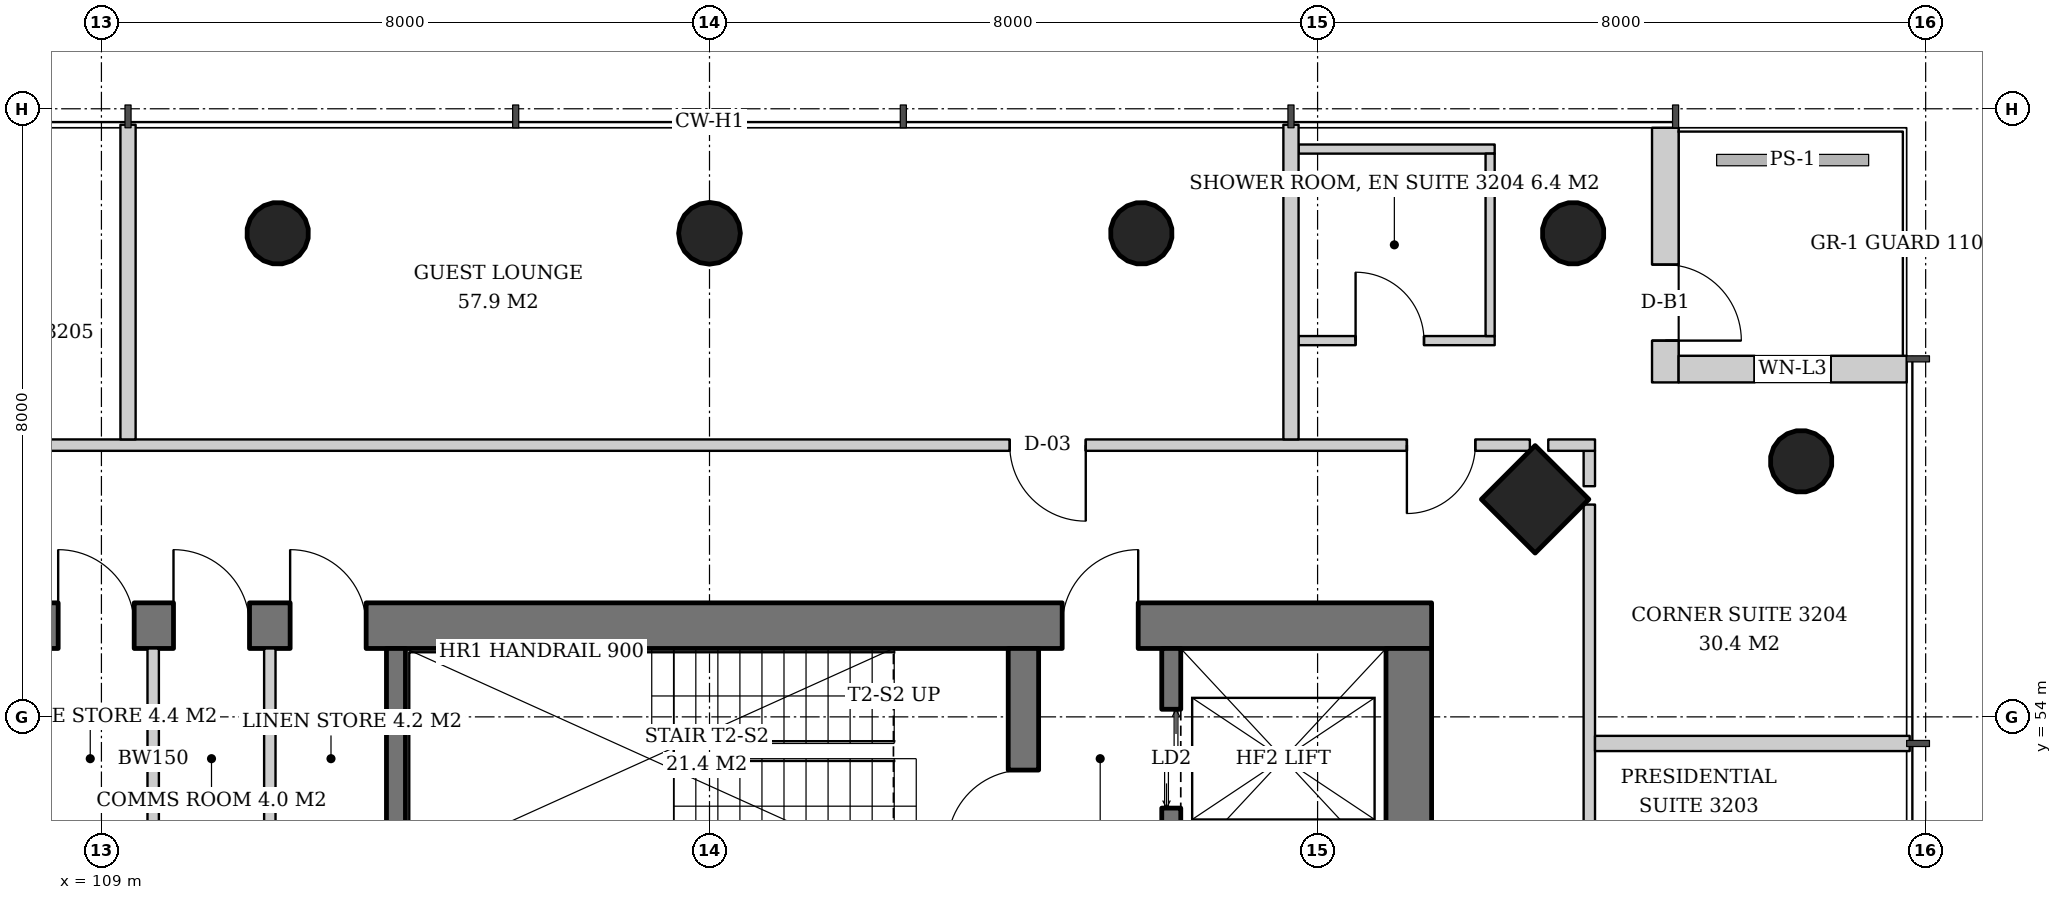
"""IFC4 building model, lengths in metres.
Left out: names, types, materials, properties, quantities, classifications, styles, units other than length and angle.
Written with IfcOpenShell. Run it as: python <this file> out.ifc"""

import sys

from ifc_helpers import new_model, si_unit, direction, frame, frame_2d, origin, origin_2d, place, context, subcontext, project, spatial, rectangle, hollow_circle, extrude, element, fill, save


model = new_model("IFC4")
c1 = context("Model", 3, precision=1e-05, world=origin(), true_north=direction((0.0, 1.0)))
c2 = subcontext(c1, "Body", "Model", "MODEL_VIEW")
j1 = project(units=[si_unit("LENGTHUNIT", "METRE"), si_unit("PLANEANGLEUNIT", "RADIAN")], contexts=[c1])
p1 = place(None, origin())
s1 = spatial("IfcSite", under=j1, at=p1, CompositionType="ELEMENT")
p2 = place(p1, origin())
s2 = spatial("IfcBuilding", under=s1, at=p2, CompositionType="ELEMENT")
p3 = place(p2, frame((0.0, 0.0, 127.4)))
s3 = spatial("IfcBuildingStorey", under=s2, at=p3, CompositionType="ELEMENT", Elevation=127.4)
p4 = place(p3, frame((127.914, 56.914, 0.0), z_axis=(-0.043029647111, -0.043029647111, 0.998146732169), x_axis=(0.707106781187, -0.707106781187, 0.0)))
e1 = element("IfcColumn", 1, at=p4, inside=s3, PredefinedType="COLUMN", context=c2, shape_type="SweptSolid", body=[
    extrude(rectangle(XDim=1.0, YDim=1.0, at=origin_2d()), origin(), (0.0, 0.0, 1.0), 3.807),
])
for number, where, z_axis, x_axis in (
    (2, (131.414, 57.414, 0.0), (-0.043, -0.043, 0.998), (0.707, -0.707, 0.0)),
    (3, (128.414, 60.414, 0.0), (-0.043, -0.043, 0.998), (0.707, -0.707, 0.0)),
):
    element("IfcColumn", number, at=place(p3, frame(where, z_axis=z_axis, x_axis=x_axis)), inside=s3, PredefinedType="COLUMN", context=c2, shape_type="SweptSolid", body=[
        extrude(hollow_circle(Radius=0.406, WallThickness=0.03, at=origin_2d()), origin(), (0.0, 0.0, 1.0), 3.807),
    ])
p5 = place(p3, frame((122.707, 60.414, 0.0), z_axis=(-0.021497706284, -0.043059584825, 0.998841188968), x_axis=(0.894693706707, -0.446680166538, 0.0)))
e4 = element("IfcColumn", 4, at=p5, inside=s3, PredefinedType="COLUMN", context=c2, shape_type="SweptSolid", body=[
    extrude(hollow_circle(Radius=0.406, WallThickness=0.03, at=origin_2d()), origin(), (0.0, 0.0, 1.0), 3.804),
])
p6 = place(p3, frame((117.0, 60.414, 0.0), z_axis=(0.0, -0.043069538298, 0.999072076915), x_axis=(1.0, 0.0, 0.0)))
e5 = element("IfcColumn", 5, at=p6, inside=s3, PredefinedType="COLUMN", context=c2, shape_type="SweptSolid", body=[
    extrude(hollow_circle(Radius=0.406, WallThickness=0.03, at=origin_2d()), origin(), (0.0, 0.0, 1.0), 3.803),
])
p7 = place(p3, frame((111.293, 60.414, 0.0), z_axis=(0.021497706284, -0.043059584825, 0.998841188968), x_axis=(0.894693706707, 0.446680166538, 0.0)))
e6 = element("IfcColumn", 6, at=p7, inside=s3, PredefinedType="COLUMN", context=c2, shape_type="SweptSolid", body=[
    extrude(hollow_circle(Radius=0.406, WallThickness=0.03, at=origin_2d()), origin(), (0.0, 0.0, 1.0), 3.804),
])
p8 = place(p3, frame((107.5, 55.2, 0.0), z_axis=(0.0, 0.0, 1.0), x_axis=(1.0, 0.0, 0.0)))
e7 = element("IfcWall", 7, at=p8, inside=s3, PredefinedType="SHEAR", context=c2, shape_type="SweptSolid", body=[
    extrude(rectangle(XDim=19.0, YDim=0.6, at=frame_2d((9.5, 0.0))), origin(), (0.0, 0.0, 1.0), 3.8),
])
p9 = place(p8, frame((14.14, 0.0, 0.0)))
e8 = element("IfcOpeningElement", 8, at=p9, cuts=e7, PredefinedType="OPENING", context=c2, shape_type="SweptSolid", body=[
    extrude(rectangle(XDim=1.0, YDim=2.1, at=frame_2d((0.5, 1.05))), frame((0.0, 0.31, 0.0), z_axis=(0.0, -1.0, 0.0), x_axis=(1.0, 0.0, 0.0)), (0.0, 0.0, 1.0), 0.62),
])
p10 = place(p8, frame((0.931, 0.0, 0.0)))
e9 = element("IfcOpeningElement", 9, at=p10, cuts=e7, PredefinedType="OPENING", context=c2, shape_type="SweptSolid", body=[
    extrude(rectangle(XDim=1.0, YDim=2.1, at=frame_2d((0.5, 1.05))), frame((0.0, 0.31, 0.0), z_axis=(0.0, -1.0, 0.0), x_axis=(1.0, 0.0, 0.0)), (0.0, 0.0, 1.0), 0.62),
])
p11 = place(p8, frame((2.448, 0.0, 0.0)))
e10 = element("IfcOpeningElement", 10, at=p11, cuts=e7, PredefinedType="OPENING", context=c2, shape_type="SweptSolid", body=[
    extrude(rectangle(XDim=1.0, YDim=2.1, at=frame_2d((0.5, 1.05))), frame((0.0, 0.31, 0.0), z_axis=(0.0, -1.0, 0.0), x_axis=(1.0, 0.0, 0.0)), (0.0, 0.0, 1.0), 0.62),
])
p12 = place(p8, frame((3.983, 0.0, 0.0)))
e11 = element("IfcOpeningElement", 11, at=p12, cuts=e7, PredefinedType="OPENING", context=c2, shape_type="SweptSolid", body=[
    extrude(rectangle(XDim=1.0, YDim=2.1, at=frame_2d((0.5, 1.05))), frame((0.0, 0.31, 0.0), z_axis=(0.0, -1.0, 0.0), x_axis=(1.0, 0.0, 0.0)), (0.0, 0.0, 1.0), 0.62),
])
p13 = place(p3, frame((126.2, 37.1, 0.0), z_axis=(0.0, 0.0, 1.0), x_axis=(0.0, 1.0, 0.0)))
e12 = element("IfcWall", 12, at=p13, inside=s3, PredefinedType="SHEAR", context=c2, shape_type="SweptSolid", body=[
    extrude(rectangle(XDim=17.8, YDim=0.6, at=frame_2d((8.9, 0.0))), origin(), (0.0, 0.0, 1.0), 3.8),
])
p14 = place(p13, frame((8.0, 0.0, 0.0)))
e13 = element("IfcOpeningElement", 13, at=p14, cuts=e12, PredefinedType="OPENING", context=c2, shape_type="SweptSolid", body=[
    extrude(rectangle(XDim=1.8, YDim=2.4, at=frame_2d((0.9, 1.2))), frame((0.0, 0.31, 0.0), z_axis=(0.0, -1.0, 0.0), x_axis=(1.0, 0.0, 0.0)), (0.0, 0.0, 1.0), 0.62),
])
p15 = place(p3, frame((121.13, 52.0, 0.0), z_axis=(0.0, 0.0, 1.0), x_axis=(0.0, 1.0, 0.0)))
e14 = element("IfcWall", 14, at=p15, inside=s3, PredefinedType="SHEAR", context=c2, shape_type="SweptSolid", body=[
    extrude(rectangle(XDim=2.9, YDim=0.4, at=frame_2d((1.45, 0.0))), origin(), (0.0, 0.0, 1.0), 3.8),
])
p16 = place(p15, frame((0.3, 0.0, 0.0)))
e15 = element("IfcOpeningElement", 15, at=p16, cuts=e14, PredefinedType="OPENING", context=c2, shape_type="SweptSolid", body=[
    extrude(rectangle(XDim=1.0, YDim=2.1, at=frame_2d((0.5, 1.05))), frame((0.0, 0.21, 0.0), z_axis=(0.0, -1.0, 0.0), x_axis=(1.0, 0.0, 0.0)), (0.0, 0.0, 1.0), 0.42),
])
p17 = place(p3, frame((129.575, 61.75, 0.0), z_axis=(0.0, 0.0, 1.0), x_axis=(0.0, -1.0, 0.0)))
e16 = element("IfcWall", 16, at=p17, inside=s3, PredefinedType="SOLIDWALL", context=c2, shape_type="SweptSolid", body=[
    extrude(rectangle(XDim=3.35, YDim=0.35, at=frame_2d((1.675, 0.0))), origin(), (0.0, 0.0, 1.0), 3.35),
])
p18 = place(p17, frame((1.8, 0.0, 0.0)))
e17 = element("IfcOpeningElement", 17, at=p18, cuts=e16, PredefinedType="OPENING", context=c2, shape_type="SweptSolid", body=[
    extrude(rectangle(XDim=1.0, YDim=2.4, at=frame_2d((0.5, 1.2))), frame((0.0, 0.185, 0.0), z_axis=(0.0, -1.0, 0.0), x_axis=(1.0, 0.0, 0.0)), (0.0, 0.0, 1.0), 0.37),
])
p19 = place(p3, frame((129.75, 58.575, 0.0), z_axis=(0.0, 0.0, 1.0), x_axis=(1.0, 0.0, 0.0)))
e18 = element("IfcWall", 18, at=p19, inside=s3, PredefinedType="SOLIDWALL", context=c2, shape_type="SweptSolid", body=[
    extrude(rectangle(XDim=3.0, YDim=0.35, at=frame_2d((1.5, 0.0))), origin(), (0.0, 0.0, 1.0), 3.35),
])
p20 = place(p19, frame((1.0, 0.0, 0.65)))
e19 = element("IfcOpeningElement", 19, at=p20, cuts=e18, PredefinedType="OPENING", context=c2, shape_type="SweptSolid", body=[
    extrude(rectangle(XDim=1.0, YDim=2.4, at=frame_2d((0.5, 1.2))), frame((0.0, 0.185, 0.0), z_axis=(0.0, -1.0, 0.0), x_axis=(1.0, 0.0, 0.0)), (0.0, 0.0, 1.0), 0.37),
])
p21 = place(p3, frame((112.875, 52.0, 0.0), z_axis=(0.0, 0.0, 1.0), x_axis=(0.0, 1.0, 0.0)))
e20 = element("IfcWall", 20, at=p21, inside=s3, PredefinedType="SHEAR", context=c2, shape_type="SweptSolid", body=[
    extrude(rectangle(XDim=2.9, YDim=0.25, at=frame_2d((1.45, 0.0))), origin(), (0.0, 0.0, 1.0), 3.8),
])
p22 = place(p3, frame((123.075, 52.0, 0.0), z_axis=(0.0, 0.0, 1.0), x_axis=(0.0, 1.0, 0.0)))
e21 = element("IfcWall", 21, at=p22, inside=s3, PredefinedType="SHEAR", context=c2, shape_type="SweptSolid", body=[
    extrude(rectangle(XDim=2.9, YDim=0.25, at=frame_2d((1.45, 0.0))), origin(), (0.0, 0.0, 1.0), 3.8),
])
p23 = place(p22, frame((0.8, 0.0, 0.0)))
e22 = element("IfcOpeningElement", 22, at=p23, cuts=e21, PredefinedType="OPENING", context=c2, shape_type="SweptSolid", body=[
    extrude(rectangle(XDim=1.3, YDim=2.2, at=frame_2d((0.65, 1.1))), frame((0.0, 0.135, 0.0), z_axis=(0.0, -1.0, 0.0), x_axis=(1.0, 0.0, 0.0)), (0.0, 0.0, 1.0), 0.27),
])
for number, where, z_axis, x_axis in (
    (23, (109.681, 52.0, 0.0), (0.0, 0.0, 1.0), (0.0, 1.0, 0.0)),
    (24, (111.216, 52.0, 0.0), (0.0, 0.0, 1.0), (0.0, 1.0, 0.0)),
):
    element("IfcWall", number, at=place(p3, frame(where, z_axis=z_axis, x_axis=x_axis)), inside=s3, PredefinedType="SOLIDWALL", context=c2, shape_type="SweptSolid", body=[
        extrude(rectangle(XDim=2.9, YDim=0.15, at=frame_2d((1.45, 0.0))), origin(), (0.0, 0.0, 1.0), 3.35),
    ])
p24 = place(p3, frame((128.575, 35.207, 0.0), z_axis=(0.0, 0.0, 1.0), x_axis=(0.0, 1.0, 0.0)))
e25 = element("IfcWall", 25, at=p24, inside=s3, PredefinedType="PARTITIONING", context=c2, shape_type="SweptSolid", body=[
    extrude(rectangle(XDim=21.586, YDim=0.15, at=frame_2d((10.793, 0.0))), origin(), (0.0, 0.0, 1.0), 2.338),
])
p25 = place(p24, frame((0.718, 0.0, 0.0)))
e26 = element("IfcOpeningElement", 26, at=p25, cuts=e25, PredefinedType="OPENING", context=c2, shape_type="SweptSolid", body=[
    extrude(rectangle(XDim=0.9, YDim=2.1, at=frame_2d((0.45, 1.05))), frame((0.0, 0.085, 0.0), z_axis=(0.0, -1.0, 0.0), x_axis=(1.0, 0.0, 0.0)), (0.0, 0.0, 1.0), 0.17),
])
p26 = place(p24, frame((5.893, 0.0, 0.0)))
e27 = element("IfcOpeningElement", 27, at=p26, cuts=e25, PredefinedType="OPENING", context=c2, shape_type="SweptSolid", body=[
    extrude(rectangle(XDim=0.9, YDim=2.1, at=frame_2d((0.45, 1.05))), frame((0.0, 0.085, 0.0), z_axis=(0.0, -1.0, 0.0), x_axis=(1.0, 0.0, 0.0)), (0.0, 0.0, 1.0), 0.17),
])
p27 = place(p3, frame((128.575, 57.035, 0.0), z_axis=(0.0, 0.0, 1.0), x_axis=(0.0, 1.0, 0.0)))
e28 = element("IfcWall", 28, at=p27, inside=s3, PredefinedType="PARTITIONING", context=c2, shape_type="SweptSolid", body=[
    extrude(rectangle(XDim=0.465, YDim=0.15, at=frame_2d((0.233, 0.0))), origin(), (0.0, 0.0, 1.0), 3.35),
])
p28 = place(p3, frame((128.65, 53.65, 0.0), z_axis=(0.0, 0.0, 1.0), x_axis=(1.0, 0.0, 0.0)))
e29 = element("IfcWall", 29, at=p28, inside=s3, PredefinedType="PARTITIONING", context=c2, shape_type="SweptSolid", body=[
    extrude(rectangle(XDim=4.14, YDim=0.2, at=frame_2d((2.07, 0.0))), origin(), (0.0, 0.0, 1.0), 2.35),
])
p29 = place(p3, frame((124.75, 58.95, 0.0), z_axis=(0.0, 0.0, 1.0), x_axis=(1.0, 0.0, 0.0)))
e30 = element("IfcWall", 30, at=p29, inside=s3, PredefinedType="PARTITIONING", context=c2, shape_type="SweptSolid", body=[
    extrude(rectangle(XDim=2.58, YDim=0.12, at=frame_2d((1.29, 0.0))), origin(), (0.0, 0.0, 1.0), 2.338),
])
p30 = place(p29, frame((0.75, 0.0, 0.0)))
e31 = element("IfcOpeningElement", 31, at=p30, cuts=e30, PredefinedType="OPENING", context=c2, shape_type="SweptSolid", body=[
    extrude(rectangle(XDim=0.9, YDim=2.1, at=frame_2d((0.45, 1.05))), frame((0.0, 0.07, 0.0), z_axis=(0.0, -1.0, 0.0), x_axis=(1.0, 0.0, 0.0)), (0.0, 0.0, 1.0), 0.14),
])
p31 = place(p3, frame((124.75, 61.47, 0.0), z_axis=(0.0, 0.0, 1.0), x_axis=(1.0, 0.0, 0.0)))
e32 = element("IfcWall", 32, at=p31, inside=s3, PredefinedType="PARTITIONING", context=c2, shape_type="SweptSolid", body=[
    extrude(rectangle(XDim=2.58, YDim=0.12, at=frame_2d((1.29, 0.0))), origin(), (0.0, 0.0, 1.0), 3.35),
])
p32 = place(p3, frame((127.27, 59.01, 0.0), z_axis=(0.0, 0.0, 1.0), x_axis=(0.0, 1.0, 0.0)))
e33 = element("IfcWall", 33, at=p32, inside=s3, PredefinedType="PARTITIONING", context=c2, shape_type="SweptSolid", body=[
    extrude(rectangle(XDim=2.4, YDim=0.12, at=frame_2d((1.2, 0.0))), origin(), (0.0, 0.0, 1.0), 2.35),
])
p33 = place(p3, frame((128.65, 57.575, 0.0), z_axis=(0.0, 0.0, 1.0), x_axis=(-1.0, 0.0, 0.0)))
e34 = element("IfcWall", 34, at=p33, inside=s3, PredefinedType="PARTITIONING", context=c2, shape_type="SweptSolid", body=[
    extrude(rectangle(XDim=0.615, YDim=0.15, at=frame_2d((0.308, 0.0))), origin(), (0.0, 0.0, 1.0), 3.35),
])
p34 = place(p3, frame((127.793, 57.575, 0.0), z_axis=(0.0, 0.0, 1.0), x_axis=(-1.0, 0.0, 0.0)))
e35 = element("IfcWall", 35, at=p34, inside=s3, PredefinedType="PARTITIONING", context=c2, shape_type="SweptSolid", body=[
    extrude(rectangle(XDim=21.586, YDim=0.15, at=frame_2d((10.793, 0.0))), origin(), (0.0, 0.0, 1.0), 2.338),
])
p35 = place(p34, frame((0.718, 0.0, 0.0)))
e36 = element("IfcOpeningElement", 36, at=p35, cuts=e35, PredefinedType="OPENING", context=c2, shape_type="SweptSolid", body=[
    extrude(rectangle(XDim=0.9, YDim=2.1, at=frame_2d((0.45, 1.05))), frame((0.0, 0.085, 0.0), z_axis=(0.0, -1.0, 0.0), x_axis=(1.0, 0.0, 0.0)), (0.0, 0.0, 1.0), 0.17),
])
p36 = place(p34, frame((5.843, 0.0, 0.0)))
e37 = element("IfcOpeningElement", 37, at=p36, cuts=e35, PredefinedType="OPENING", context=c2, shape_type="SweptSolid", body=[
    extrude(rectangle(XDim=1.0, YDim=2.1, at=frame_2d((0.5, 1.05))), frame((0.0, 0.085, 0.0), z_axis=(0.0, -1.0, 0.0), x_axis=(1.0, 0.0, 0.0)), (0.0, 0.0, 1.0), 0.17),
])
for number, where, z_axis, x_axis in (
    (38, (124.65, 57.65, 0.0), (0.0, 0.0, 1.0), (0.0, 1.0, 0.0)),
    (39, (109.35, 57.65, 0.0), (0.0, 0.0, 1.0), (0.0, 1.0, 0.0)),
):
    element("IfcWall", number, at=place(p3, frame(where, z_axis=z_axis, x_axis=x_axis)), inside=s3, PredefinedType="PARTITIONING", context=c2, shape_type="SweptSolid", body=[
        extrude(rectangle(XDim=4.14, YDim=0.2, at=frame_2d((2.07, 0.0))), origin(), (0.0, 0.0, 1.0), 2.35),
    ])
p37 = place(p18, origin())
e40 = element("IfcDoor", 40, at=p37, inside=s3, OperationType="SINGLE_SWING_RIGHT", PredefinedType="DOOR", context=c2, shape_type="SweptSolid", body=[
    extrude(rectangle(XDim=1.0, YDim=2.4, at=frame_2d((0.5, 1.2))), frame((0.0, 0.025, 0.0), z_axis=(0.0, -1.0, 0.0), x_axis=(1.0, 0.0, 0.0)), (0.0, 0.0, 1.0), 0.05),
])
fill(e17, e40)
p38 = place(p20, origin())
e41 = element("IfcWindow", 41, at=p38, inside=s3, PartitioningType="SINGLE_PANEL", PredefinedType="WINDOW", context=c2, shape_type="SweptSolid", body=[
    extrude(rectangle(XDim=1.0, YDim=2.4, at=frame_2d((0.5, 1.2))), frame((0.0, 0.03, 0.0), z_axis=(0.0, -1.0, 0.0), x_axis=(1.0, 0.0, 0.0)), (0.0, 0.0, 1.0), 0.06),
])
fill(e19, e41)
p39 = place(p23, origin())
e42 = element("IfcDoor", 42, at=p39, inside=s3, OperationType="DOUBLE_DOOR_SLIDING", PredefinedType="DOOR", context=c2, shape_type="SweptSolid", body=[
    extrude(rectangle(XDim=1.3, YDim=2.2, at=frame_2d((0.65, 1.1))), frame((0.0, 0.025, 0.0), z_axis=(0.0, -1.0, 0.0), x_axis=(1.0, 0.0, 0.0)), (0.0, 0.0, 1.0), 0.05),
])
fill(e22, e42)
p40 = place(p16, origin())
e43 = element("IfcDoor", 43, at=p40, inside=s3, OperationType="SINGLE_SWING_LEFT", PredefinedType="DOOR", context=c2, shape_type="SweptSolid", body=[
    extrude(rectangle(XDim=1.0, YDim=2.1, at=frame_2d((0.5, 1.05))), frame((0.0, 0.025, 0.0), z_axis=(0.0, -1.0, 0.0), x_axis=(1.0, 0.0, 0.0)), (0.0, 0.0, 1.0), 0.05),
])
fill(e15, e43)
p41 = place(p9, origin())
e44 = element("IfcDoor", 44, at=p41, inside=s3, OperationType="SINGLE_SWING_RIGHT", PredefinedType="DOOR", context=c2, shape_type="SweptSolid", body=[
    extrude(rectangle(XDim=1.0, YDim=2.1, at=frame_2d((0.5, 1.05))), frame((0.0, 0.025, 0.0), z_axis=(0.0, -1.0, 0.0), x_axis=(1.0, 0.0, 0.0)), (0.0, 0.0, 1.0), 0.05),
])
fill(e8, e44)
p42 = place(p10, origin())
e45 = element("IfcDoor", 45, at=p42, inside=s3, OperationType="SINGLE_SWING_LEFT", PredefinedType="DOOR", context=c2, shape_type="SweptSolid", body=[
    extrude(rectangle(XDim=1.0, YDim=2.1, at=frame_2d((0.5, 1.05))), frame((0.0, -0.24, 0.0), z_axis=(0.0, -1.0, 0.0), x_axis=(1.0, 0.0, 0.0)), (0.0, 0.0, 1.0), 0.05),
])
fill(e9, e45)
p43 = place(p11, origin())
e46 = element("IfcDoor", 46, at=p43, inside=s3, OperationType="SINGLE_SWING_LEFT", PredefinedType="DOOR", context=c2, shape_type="SweptSolid", body=[
    extrude(rectangle(XDim=1.0, YDim=2.1, at=frame_2d((0.5, 1.05))), frame((0.0, -0.24, 0.0), z_axis=(0.0, -1.0, 0.0), x_axis=(1.0, 0.0, 0.0)), (0.0, 0.0, 1.0), 0.05),
])
fill(e10, e46)
p44 = place(p12, origin())
e47 = element("IfcDoor", 47, at=p44, inside=s3, OperationType="SINGLE_SWING_LEFT", PredefinedType="DOOR", context=c2, shape_type="SweptSolid", body=[
    extrude(rectangle(XDim=1.0, YDim=2.1, at=frame_2d((0.5, 1.05))), frame((0.0, -0.24, 0.0), z_axis=(0.0, -1.0, 0.0), x_axis=(1.0, 0.0, 0.0)), (0.0, 0.0, 1.0), 0.05),
])
fill(e11, e47)
p45 = place(p30, origin())
e48 = element("IfcDoor", 48, at=p45, inside=s3, OperationType="SINGLE_SWING_LEFT", PredefinedType="DOOR", context=c2, shape_type="SweptSolid", body=[
    extrude(rectangle(XDim=0.9, YDim=2.1, at=frame_2d((0.45, 1.05))), frame((0.0, 0.025, 0.0), z_axis=(0.0, -1.0, 0.0), x_axis=(1.0, 0.0, 0.0)), (0.0, 0.0, 1.0), 0.05),
])
fill(e31, e48)
p46 = place(p35, origin())
e49 = element("IfcDoor", 49, at=p46, inside=s3, OperationType="SINGLE_SWING_RIGHT", PredefinedType="DOOR", context=c2, shape_type="SweptSolid", body=[
    extrude(rectangle(XDim=0.9, YDim=2.1, at=frame_2d((0.45, 1.05))), frame((0.0, 0.025, 0.0), z_axis=(0.0, -1.0, 0.0), x_axis=(1.0, 0.0, 0.0)), (0.0, 0.0, 1.0), 0.05),
])
fill(e36, e49)
p47 = place(p36, origin())
e50 = element("IfcDoor", 50, at=p47, inside=s3, OperationType="SINGLE_SWING_LEFT", PredefinedType="DOOR", context=c2, shape_type="SweptSolid", body=[
    extrude(rectangle(XDim=1.0, YDim=2.1, at=frame_2d((0.5, 1.05))), frame((0.0, 0.025, 0.0), z_axis=(0.0, -1.0, 0.0), x_axis=(1.0, 0.0, 0.0)), (0.0, 0.0, 1.0), 0.05),
])
fill(e37, e50)
save(model, sys.argv[1])
